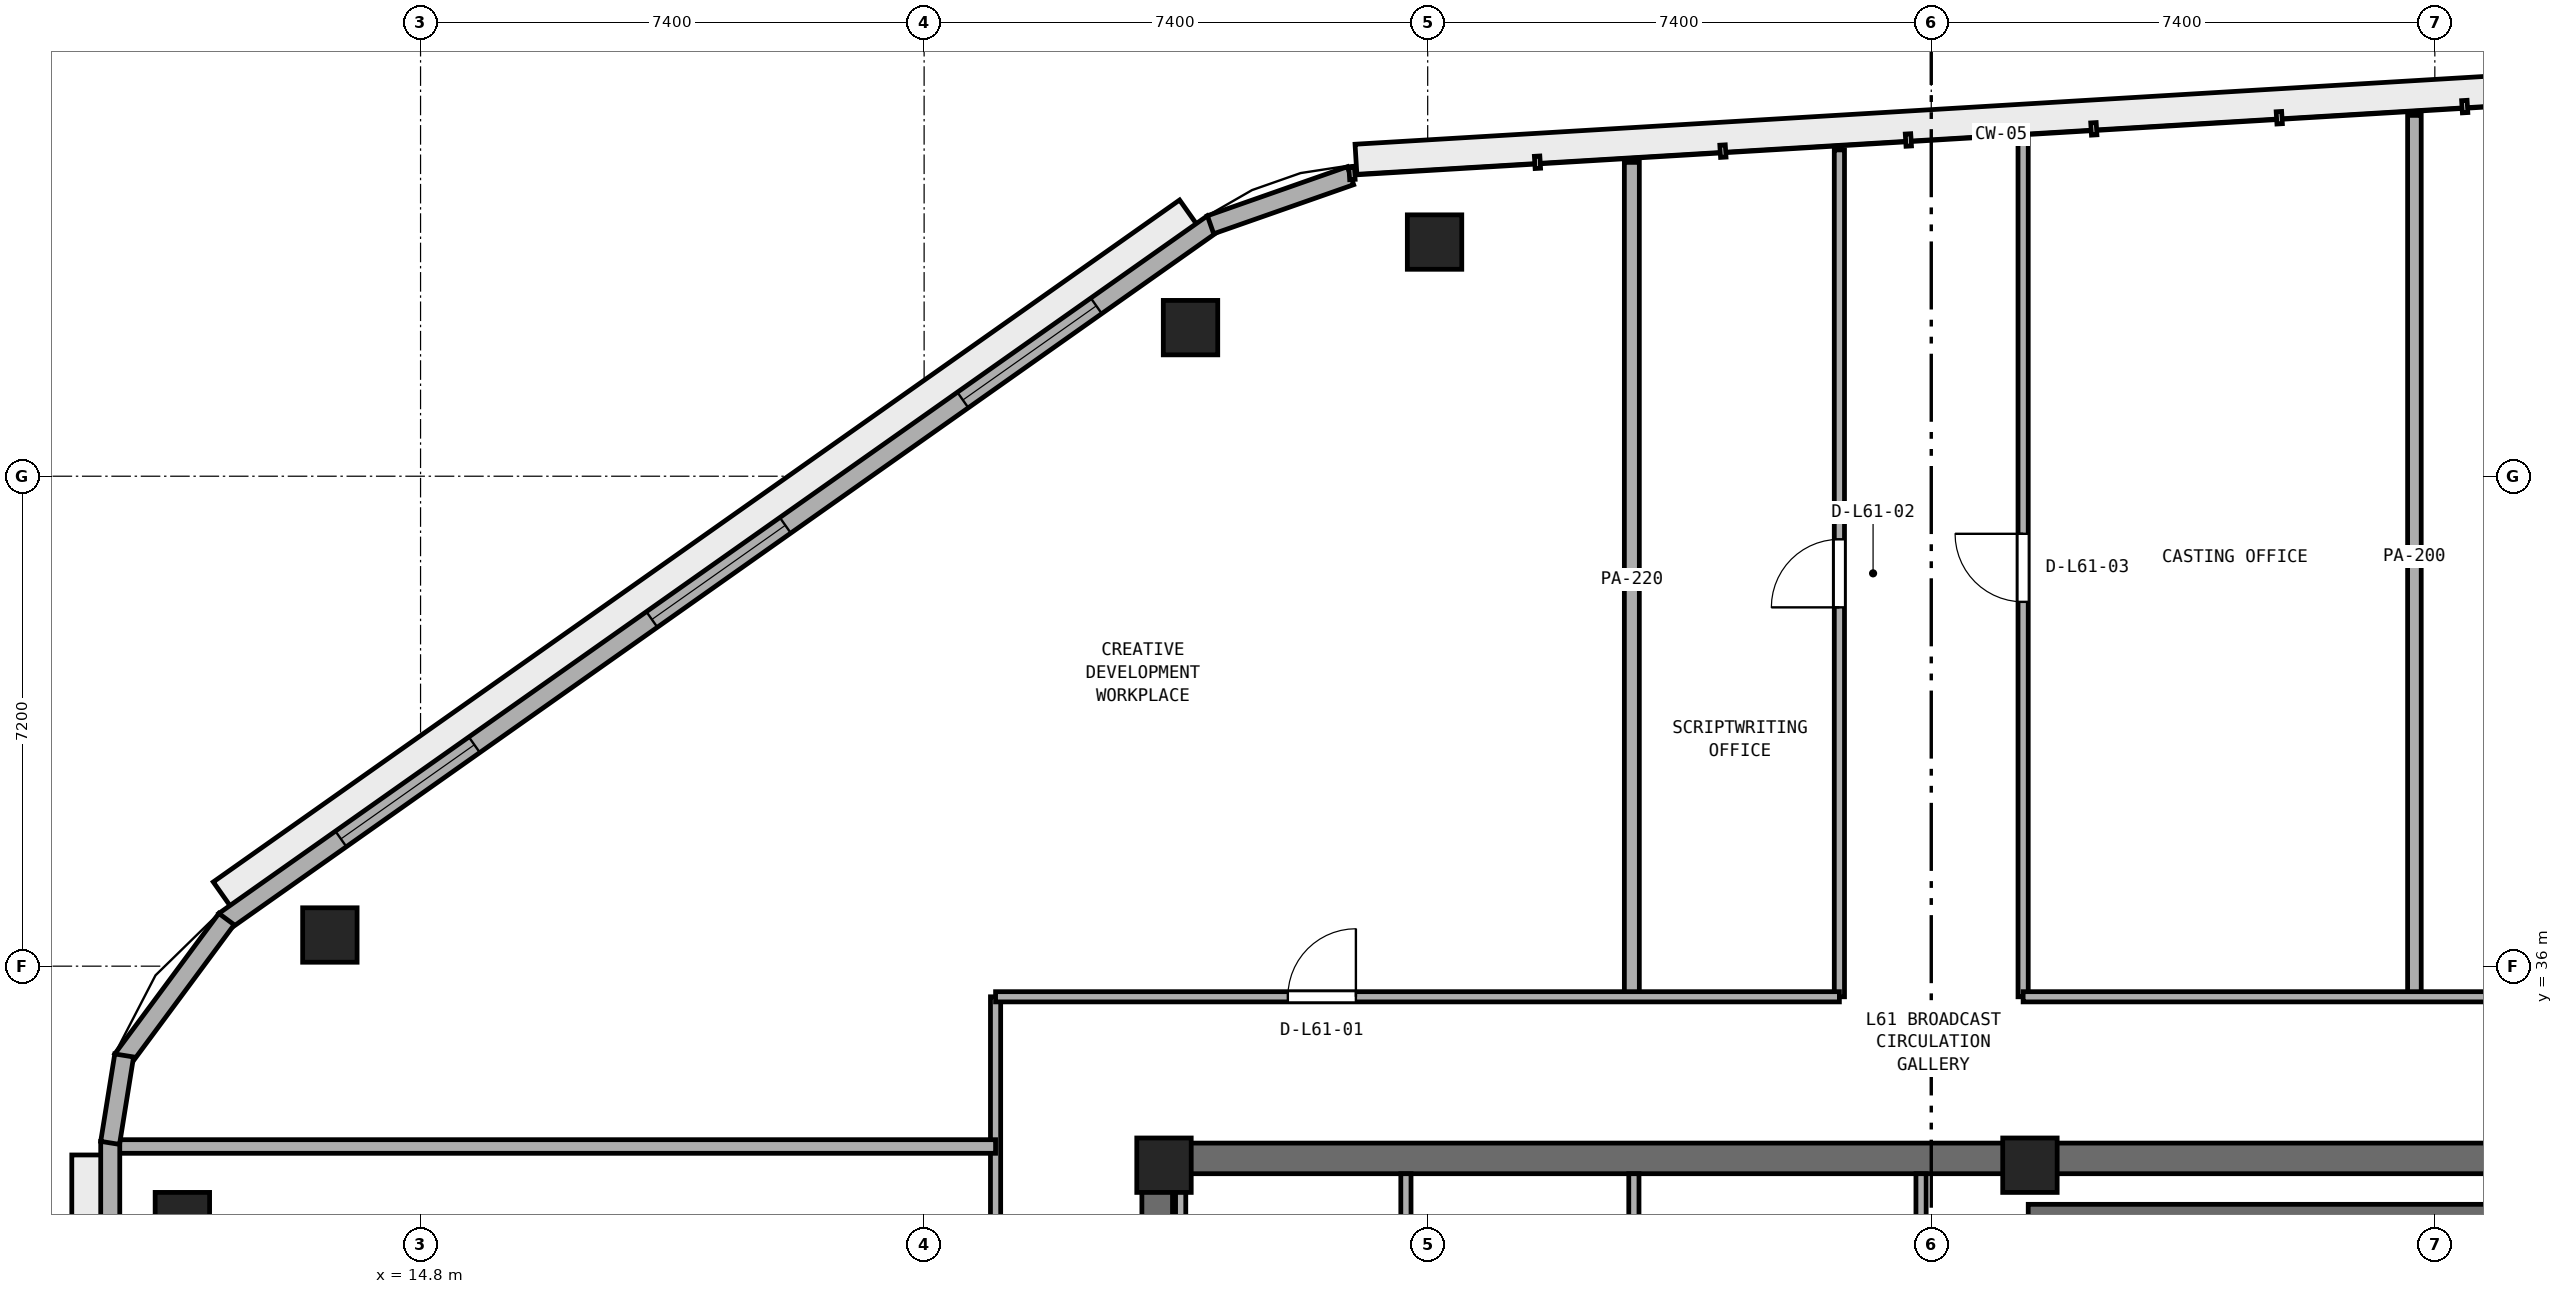
"""IFC4 building model, lengths in metres.
Left out: names, types, materials, properties, quantities, classifications, styles, units other than length and angle.
Written with IfcOpenShell. Run it as: python <this file> out.ifc"""

import sys

from ifc_helpers import new_model, si_unit, direction, frame, frame_2d, origin, origin_2d, place, context, subcontext, project, spatial, rectangle, extrude, element, fill, save


model = new_model("IFC4")
c1 = context("Model", 3, precision=1e-05, world=origin(), true_north=direction((0.0, 1.0)))
c2 = subcontext(c1, "Body", "Model", "MODEL_VIEW")
j1 = project(units=[si_unit("LENGTHUNIT", "METRE"), si_unit("PLANEANGLEUNIT", "RADIAN")], contexts=[c1])
p1 = place(None, origin())
s1 = spatial("IfcSite", under=j1, at=p1, CompositionType="ELEMENT")
p2 = place(p1, origin())
s2 = spatial("IfcBuilding", under=s1, at=p2, CompositionType="ELEMENT")
p3 = place(p2, frame((0.0, 0.0, 240.2)))
s3 = spatial("IfcBuildingStorey", under=s2, at=p3, CompositionType="ELEMENT", Elevation=240.2)
p4 = place(p3, frame((25.4, 33.175, 0.0), z_axis=(0.0, 0.0, 1.0), x_axis=(1.0, 0.0, 0.0)))
e1 = element("IfcWall", 1, at=p4, inside=s3, PredefinedType="SHEAR", context=c2, shape_type="SweptSolid", body=[
    extrude(rectangle(XDim=23.2, YDim=0.45, at=frame_2d((11.6, 0.0))), origin(), (0.0, 0.0, 1.0), 3.51),
])
p5 = place(p3, frame((25.625, 17.45, 0.0), z_axis=(0.0, 0.0, 1.0), x_axis=(0.0, 1.0, 0.0)))
e2 = element("IfcWall", 2, at=p5, inside=s3, PredefinedType="SHEAR", context=c2, shape_type="SweptSolid", body=[
    extrude(rectangle(XDim=15.5, YDim=0.45, at=frame_2d((7.75, 0.0))), origin(), (0.0, 0.0, 1.0), 3.51),
])
p6 = place(p5, frame((7.0, 0.0, 0.0)))
e3 = element("IfcOpeningElement", 3, at=p6, cuts=e2, PredefinedType="OPENING", context=c2, shape_type="SweptSolid", body=[
    extrude(rectangle(XDim=1.5, YDim=2.15, at=frame_2d((0.75, 1.075))), frame((0.0, 0.235, 0.0), z_axis=(0.0, -1.0, 0.0), x_axis=(1.0, 0.0, 0.0)), (0.0, 0.0, 1.0), 0.47),
])
for number, where, z_axis, x_axis in (
    (4, (38.45, 33.075, 0.0), (0.0, 0.0, 1.0), (1.0, 0.0, 0.0)),
    (5, (25.725, 33.075, 0.0), (0.0, 0.0, 1.0), (1.0, 0.0, 0.0)),
):
    element("IfcColumn", number, at=place(p3, frame(where, z_axis=z_axis, x_axis=x_axis)), inside=s3, PredefinedType="PILASTER", context=c2, shape_type="SweptSolid", body=[
        extrude(rectangle(XDim=0.8, YDim=0.8, at=origin_2d()), origin(), (0.0, 0.0, 1.0), 3.8),
    ])
for number, where, z_axis, x_axis in (
    (6, (29.701, 46.641, 0.0), (0.0, 0.0, 1.0), (1.0, 0.0, 0.0)),
    (7, (26.115, 45.384, 0.0), (0.0, 0.0, 1.0), (1.0, 0.0, 0.0)),
    (8, (13.467, 36.458, 0.0), (0.0, 0.0, 1.0), (1.0, 0.0, 0.0)),
    (9, (11.3, 32.275, 0.0), (0.0, 0.0, 1.0), (1.0, 0.0, 0.0)),
):
    element("IfcColumn", number, at=place(p3, frame(where, z_axis=z_axis, x_axis=x_axis)), inside=s3, PredefinedType="COLUMN", context=c2, shape_type="SweptSolid", body=[
        extrude(rectangle(XDim=0.8, YDim=0.8, at=origin_2d()), origin(), (0.0, 0.0, 1.0), 3.8),
    ])
p7 = place(p3, frame((38.425, 32.375, 0.0), z_axis=(0.0, 0.0, 1.0), x_axis=(1.0, 0.0, 0.0)))
e10 = element("IfcWall", 10, at=p7, inside=s3, PredefinedType="SHEAR", context=c2, shape_type="SweptSolid", body=[
    extrude(rectangle(XDim=7.3, YDim=0.25, at=frame_2d((3.65, 0.0))), origin(), (0.0, 0.0, 1.0), 3.51),
])
p8 = place(p3, frame((25.97, 30.65, 0.0), z_axis=(0.0, 0.0, 1.0), x_axis=(0.0, 1.0, 0.0)))
e11 = element("IfcWall", 11, at=p8, inside=s3, PredefinedType="PARTITIONING", context=c2, shape_type="SweptSolid", body=[
    extrude(rectangle(XDim=2.3, YDim=0.15, at=frame_2d((1.15, 0.0))), origin(), (0.0, 0.0, 1.0), 2.61),
])
for number, where, z_axis, x_axis in (
    (12, (29.28, 30.65, 0.0), (0.0, 0.0, 1.0), (0.0, 1.0, 0.0)),
    (13, (32.63, 30.65, 0.0), (0.0, 0.0, 1.0), (0.0, 1.0, 0.0)),
    (14, (36.85, 30.65, 0.0), (0.0, 0.0, 1.0), (0.0, 1.0, 0.0)),
):
    element("IfcWall", number, at=place(p3, frame(where, z_axis=z_axis, x_axis=x_axis)), inside=s3, PredefinedType="PARTITIONING", context=c2, shape_type="SweptSolid", body=[
        extrude(rectangle(XDim=2.3, YDim=0.15, at=frame_2d((1.15, 0.0))), origin(), (0.0, 0.0, 1.0), 3.51),
    ])
p9 = place(p3, frame((44.1, 35.55, 0.0), z_axis=(0.0, 0.0, 1.0), x_axis=(0.0, 1.0, 0.0)))
e15 = element("IfcWall", 15, at=p9, inside=s3, PredefinedType="PARTITIONING", context=c2, shape_type="SweptSolid", body=[
    extrude(rectangle(XDim=12.953, YDim=0.2, at=frame_2d((6.476, 0.0))), origin(), (0.0, 0.0, 1.0), 3.51),
])
p10 = place(p3, frame((38.35, 35.55, 0.0), z_axis=(0.0, 0.0, 1.0), x_axis=(0.0, 1.0, 0.0)))
e16 = element("IfcWall", 16, at=p10, inside=s3, PredefinedType="PARTITIONING", context=c2, shape_type="SweptSolid", body=[
    extrude(rectangle(XDim=12.607, YDim=0.15, at=frame_2d((6.304, 0.0))), origin(), (0.0, 0.0, 1.0), 3.51),
])
p11 = place(p10, frame((5.804, 0.0, 0.0)))
e17 = element("IfcOpeningElement", 17, at=p11, cuts=e16, PredefinedType="OPENING", context=c2, shape_type="SweptSolid", body=[
    extrude(rectangle(XDim=1.0, YDim=2.12, at=frame_2d((0.5, 1.06))), frame((0.0, 0.085, 0.0), z_axis=(0.0, -1.0, 0.0), x_axis=(1.0, 0.0, 0.0)), (0.0, 0.0, 1.0), 0.17),
])
p12 = place(p3, frame((35.65, 35.55, 0.0), z_axis=(0.0, 0.0, 1.0), x_axis=(0.0, 1.0, 0.0)))
e18 = element("IfcWall", 18, at=p12, inside=s3, PredefinedType="PARTITIONING", context=c2, shape_type="SweptSolid", body=[
    extrude(rectangle(XDim=12.445, YDim=0.15, at=frame_2d((6.223, 0.0))), origin(), (0.0, 0.0, 1.0), 3.51),
])
p13 = place(p12, frame((5.723, 0.0, 0.0)))
e19 = element("IfcOpeningElement", 19, at=p13, cuts=e18, PredefinedType="OPENING", context=c2, shape_type="SweptSolid", body=[
    extrude(rectangle(XDim=1.0, YDim=2.12, at=frame_2d((0.5, 1.06))), frame((0.0, 0.085, 0.0), z_axis=(0.0, -1.0, 0.0), x_axis=(1.0, 0.0, 0.0)), (0.0, 0.0, 1.0), 0.17),
])
p14 = place(p3, frame((32.6, 35.55, 0.0), z_axis=(0.0, 0.0, 1.0), x_axis=(0.0, 1.0, 0.0)))
e20 = element("IfcWall", 20, at=p14, inside=s3, PredefinedType="PARTITIONING", context=c2, shape_type="SweptSolid", body=[
    extrude(rectangle(XDim=12.262, YDim=0.22, at=frame_2d((6.131, 0.0))), origin(), (0.0, 0.0, 1.0), 3.51),
])
p15 = place(p3, frame((23.25, 14.85, 0.0), z_axis=(0.0, 0.0, 1.0), x_axis=(0.0, 1.0, 0.0)))
e21 = element("IfcWall", 21, at=p15, inside=s3, PredefinedType="PARTITIONING", context=c2, shape_type="SweptSolid", body=[
    extrude(rectangle(XDim=20.7, YDim=0.15, at=frame_2d((10.35, 0.0))), origin(), (0.0, 0.0, 1.0), 3.51),
])
p16 = place(p15, frame((9.9, 0.0, 0.0)))
e22 = element("IfcOpeningElement", 22, at=p16, cuts=e21, PredefinedType="OPENING", context=c2, shape_type="SweptSolid", body=[
    extrude(rectangle(XDim=0.9, YDim=2.1, at=frame_2d((0.45, 1.05))), frame((0.0, 0.085, 0.0), z_axis=(0.0, -1.0, 0.0), x_axis=(1.0, 0.0, 0.0)), (0.0, 0.0, 1.0), 0.17),
])
p17 = place(p3, frame((10.305, 33.35, 0.0), z_axis=(0.0, 0.0, 1.0), x_axis=(1.0, 0.0, 0.0)))
e23 = element("IfcWall", 23, at=p17, inside=s3, PredefinedType="PARTITIONING", context=c2, shape_type="SweptSolid", body=[
    extrude(rectangle(XDim=12.945, YDim=0.2, at=frame_2d((6.473, 0.0))), origin(), (0.0, 0.0, 1.0), 3.51),
])
p18 = place(p3, frame((23.25, 35.55, 0.0), z_axis=(0.0, 0.0, 1.0), x_axis=(1.0, 0.0, 0.0)))
e24 = element("IfcWall", 24, at=p18, inside=s3, PredefinedType="PARTITIONING", context=c2, shape_type="SweptSolid", body=[
    extrude(rectangle(XDim=12.4, YDim=0.15, at=frame_2d((6.2, 0.0))), origin(), (0.0, 0.0, 1.0), 3.51),
])
p19 = place(p18, frame((4.295, 0.0, 0.0)))
e25 = element("IfcOpeningElement", 25, at=p19, cuts=e24, PredefinedType="OPENING", context=c2, shape_type="SweptSolid", body=[
    extrude(rectangle(XDim=1.0, YDim=2.12, at=frame_2d((0.5, 1.06))), frame((0.0, 0.085, 0.0), z_axis=(0.0, -1.0, 0.0), x_axis=(1.0, 0.0, 0.0)), (0.0, 0.0, 1.0), 0.17),
])
p20 = place(p3, frame((38.35, 35.55, 0.0), z_axis=(0.0, 0.0, 1.0), x_axis=(1.0, 0.0, 0.0)))
e26 = element("IfcWall", 26, at=p20, inside=s3, PredefinedType="PARTITIONING", context=c2, shape_type="SweptSolid", body=[
    extrude(rectangle(XDim=12.4, YDim=0.15, at=frame_2d((6.2, 0.0))), origin(), (0.0, 0.0, 1.0), 3.51),
])
p21 = place(p20, frame((8.505, 0.0, 0.0)))
e27 = element("IfcOpeningElement", 27, at=p21, cuts=e26, PredefinedType="OPENING", context=c2, shape_type="SweptSolid", body=[
    extrude(rectangle(XDim=0.9, YDim=2.1, at=frame_2d((0.45, 1.05))), frame((0.0, 0.085, 0.0), z_axis=(0.0, -1.0, 0.0), x_axis=(1.0, 0.0, 0.0)), (0.0, 0.0, 1.0), 0.17),
])
p22 = place(p3, frame((26.443, 46.913, 0.0), z_axis=(0.0, 0.0, 1.0), x_axis=(-0.817024179766, -0.576603407619, 0.0)))
e28 = element("IfcWall", 28, at=p22, inside=s3, PredefinedType="STANDARD", context=c2, shape_type="SweptSolid", body=[
    extrude(rectangle(XDim=17.78, YDim=0.28, at=frame_2d((8.89, 0.0))), origin(), (0.0, 0.0, 1.0), 3.51),
])
p23 = place(p22, frame((2.097, 0.0, 0.9)))
e29 = element("IfcOpeningElement", 29, at=p23, cuts=e28, PredefinedType="OPENING", context=c2, shape_type="SweptSolid", body=[
    extrude(rectangle(XDim=2.4, YDim=1.75, at=frame_2d((1.2, 0.875))), frame((0.0, 0.15, 0.0), z_axis=(0.0, -1.0, 0.0), x_axis=(1.0, 0.0, 0.0)), (0.0, 0.0, 1.0), 0.3),
])
p24 = place(p22, frame((7.69, 0.0, 0.9)))
e30 = element("IfcOpeningElement", 30, at=p24, cuts=e28, PredefinedType="OPENING", context=c2, shape_type="SweptSolid", body=[
    extrude(rectangle(XDim=2.4, YDim=1.75, at=frame_2d((1.2, 0.875))), frame((0.0, 0.15, 0.0), z_axis=(0.0, -1.0, 0.0), x_axis=(1.0, 0.0, 0.0)), (0.0, 0.0, 1.0), 0.3),
])
p25 = place(p22, frame((13.283, 0.0, 0.9)))
e31 = element("IfcOpeningElement", 31, at=p25, cuts=e28, PredefinedType="OPENING", context=c2, shape_type="SweptSolid", body=[
    extrude(rectangle(XDim=2.4, YDim=1.75, at=frame_2d((1.2, 0.875))), frame((0.0, 0.15, 0.0), z_axis=(0.0, -1.0, 0.0), x_axis=(1.0, 0.0, 0.0)), (0.0, 0.0, 1.0), 0.3),
])
p26 = place(p3, frame((10.24, 33.425, 0.0), z_axis=(0.0, 0.0, 1.0), x_axis=(0.0, -1.0, 0.0)))
e32 = element("IfcWall", 32, at=p26, inside=s3, PredefinedType="STANDARD", context=c2, shape_type="SweptSolid", body=[
    extrude(rectangle(XDim=17.257, YDim=0.28, at=frame_2d((8.628, 0.0))), origin(), (0.0, 0.0, 1.0), 3.51),
])
p27 = place(p26, frame((8.078, 0.0, 0.0)))
e33 = element("IfcOpeningElement", 33, at=p27, cuts=e32, PredefinedType="OPENING", context=c2, shape_type="SweptSolid", body=[
    extrude(rectangle(XDim=1.1, YDim=2.2, at=frame_2d((0.55, 1.1))), frame((0.0, 0.15, 0.0), z_axis=(0.0, -1.0, 0.0), x_axis=(1.0, 0.0, 0.0)), (0.0, 0.0, 1.0), 0.3),
])
p28 = place(p26, frame((2.01, 0.0, 0.9)))
e34 = element("IfcOpeningElement", 34, at=p28, cuts=e32, PredefinedType="OPENING", context=c2, shape_type="SweptSolid", body=[
    extrude(rectangle(XDim=2.4, YDim=1.75, at=frame_2d((1.2, 0.875))), frame((0.0, 0.15, 0.0), z_axis=(0.0, -1.0, 0.0), x_axis=(1.0, 0.0, 0.0)), (0.0, 0.0, 1.0), 0.3),
])
p29 = place(p26, frame((12.847, 0.0, 0.9)))
e35 = element("IfcOpeningElement", 35, at=p29, cuts=e32, PredefinedType="OPENING", context=c2, shape_type="SweptSolid", body=[
    extrude(rectangle(XDim=2.4, YDim=1.75, at=frame_2d((1.2, 0.875))), frame((0.0, 0.15, 0.0), z_axis=(0.0, -1.0, 0.0), x_axis=(1.0, 0.0, 0.0)), (0.0, 0.0, 1.0), 0.3),
])
p30 = place(p3, frame((28.466, 47.616, 0.0), z_axis=(0.0, 0.0, 1.0), x_axis=(-0.94368711622, -0.330839276206, 0.0)))
e36 = element("IfcWall", 36, at=p30, inside=s3, PredefinedType="STANDARD", context=c2, shape_type="SweptSolid", body=[
    extrude(rectangle(XDim=2.18, YDim=0.28, at=frame_2d((1.09, 0.0))), origin(), (0.0, 0.0, 1.0), 3.51),
])
p31 = place(p3, frame((11.948, 36.692, 0.0), z_axis=(0.0, 0.0, 1.0), x_axis=(-0.595170751493, -0.803599263668, 0.0)))
e37 = element("IfcWall", 37, at=p31, inside=s3, PredefinedType="STANDARD", context=c2, shape_type="SweptSolid", body=[
    extrude(rectangle(XDim=2.57, YDim=0.28, at=frame_2d((1.285, 0.0))), origin(), (0.0, 0.0, 1.0), 3.51),
])
p32 = place(p3, frame((10.445, 34.688, 0.0), z_axis=(0.0, 0.0, 1.0), x_axis=(-0.158524605336, -0.987355027081, 0.0)))
e38 = element("IfcWall", 38, at=p32, inside=s3, PredefinedType="STANDARD", context=c2, shape_type="SweptSolid", body=[
    extrude(rectangle(XDim=1.301, YDim=0.28, at=frame_2d((0.651, 0.0))), origin(), (0.0, 0.0, 1.0), 3.51),
])
p33 = place(p19, origin())
e39 = element("IfcDoor", 39, at=p33, inside=s3, OperationType="SINGLE_SWING_RIGHT", PredefinedType="DOOR", context=c2, shape_type="SweptSolid", body=[
    extrude(rectangle(XDim=1.0, YDim=2.12, at=frame_2d((0.5, 1.06))), frame((0.0, 0.025, 0.0), z_axis=(0.0, -1.0, 0.0), x_axis=(1.0, 0.0, 0.0)), (0.0, 0.0, 1.0), 0.05),
])
fill(e25, e39)
p34 = place(p13, origin())
e40 = element("IfcDoor", 40, at=p34, inside=s3, OperationType="SINGLE_SWING_LEFT", PredefinedType="DOOR", context=c2, shape_type="SweptSolid", body=[
    extrude(rectangle(XDim=1.0, YDim=2.12, at=frame_2d((0.5, 1.06))), frame((0.0, 0.025, 0.0), z_axis=(0.0, -1.0, 0.0), x_axis=(1.0, 0.0, 0.0)), (0.0, 0.0, 1.0), 0.05),
])
fill(e19, e40)
p35 = place(p11, origin())
e41 = element("IfcDoor", 41, at=p35, inside=s3, OperationType="SINGLE_SWING_RIGHT", PredefinedType="DOOR", context=c2, shape_type="SweptSolid", body=[
    extrude(rectangle(XDim=1.0, YDim=2.12, at=frame_2d((0.5, 1.06))), frame((0.0, 0.025, 0.0), z_axis=(0.0, -1.0, 0.0), x_axis=(1.0, 0.0, 0.0)), (0.0, 0.0, 1.0), 0.05),
])
fill(e17, e41)
p36 = place(p23, origin())
e42 = element("IfcWindow", 42, at=p36, inside=s3, PartitioningType="SINGLE_PANEL", PredefinedType="WINDOW", context=c2, shape_type="SweptSolid", body=[
    extrude(rectangle(XDim=2.4, YDim=1.75, at=frame_2d((1.2, 0.875))), frame((0.0, 0.03, 0.0), z_axis=(0.0, -1.0, 0.0), x_axis=(1.0, 0.0, 0.0)), (0.0, 0.0, 1.0), 0.06),
])
fill(e29, e42)
p37 = place(p24, origin())
e43 = element("IfcWindow", 43, at=p37, inside=s3, PartitioningType="SINGLE_PANEL", PredefinedType="WINDOW", context=c2, shape_type="SweptSolid", body=[
    extrude(rectangle(XDim=2.4, YDim=1.75, at=frame_2d((1.2, 0.875))), frame((0.0, 0.03, 0.0), z_axis=(0.0, -1.0, 0.0), x_axis=(1.0, 0.0, 0.0)), (0.0, 0.0, 1.0), 0.06),
])
fill(e30, e43)
p38 = place(p25, origin())
e44 = element("IfcWindow", 44, at=p38, inside=s3, PartitioningType="SINGLE_PANEL", PredefinedType="WINDOW", context=c2, shape_type="SweptSolid", body=[
    extrude(rectangle(XDim=2.4, YDim=1.75, at=frame_2d((1.2, 0.875))), frame((0.0, 0.03, 0.0), z_axis=(0.0, -1.0, 0.0), x_axis=(1.0, 0.0, 0.0)), (0.0, 0.0, 1.0), 0.06),
])
fill(e31, e44)
save(model, sys.argv[1])
